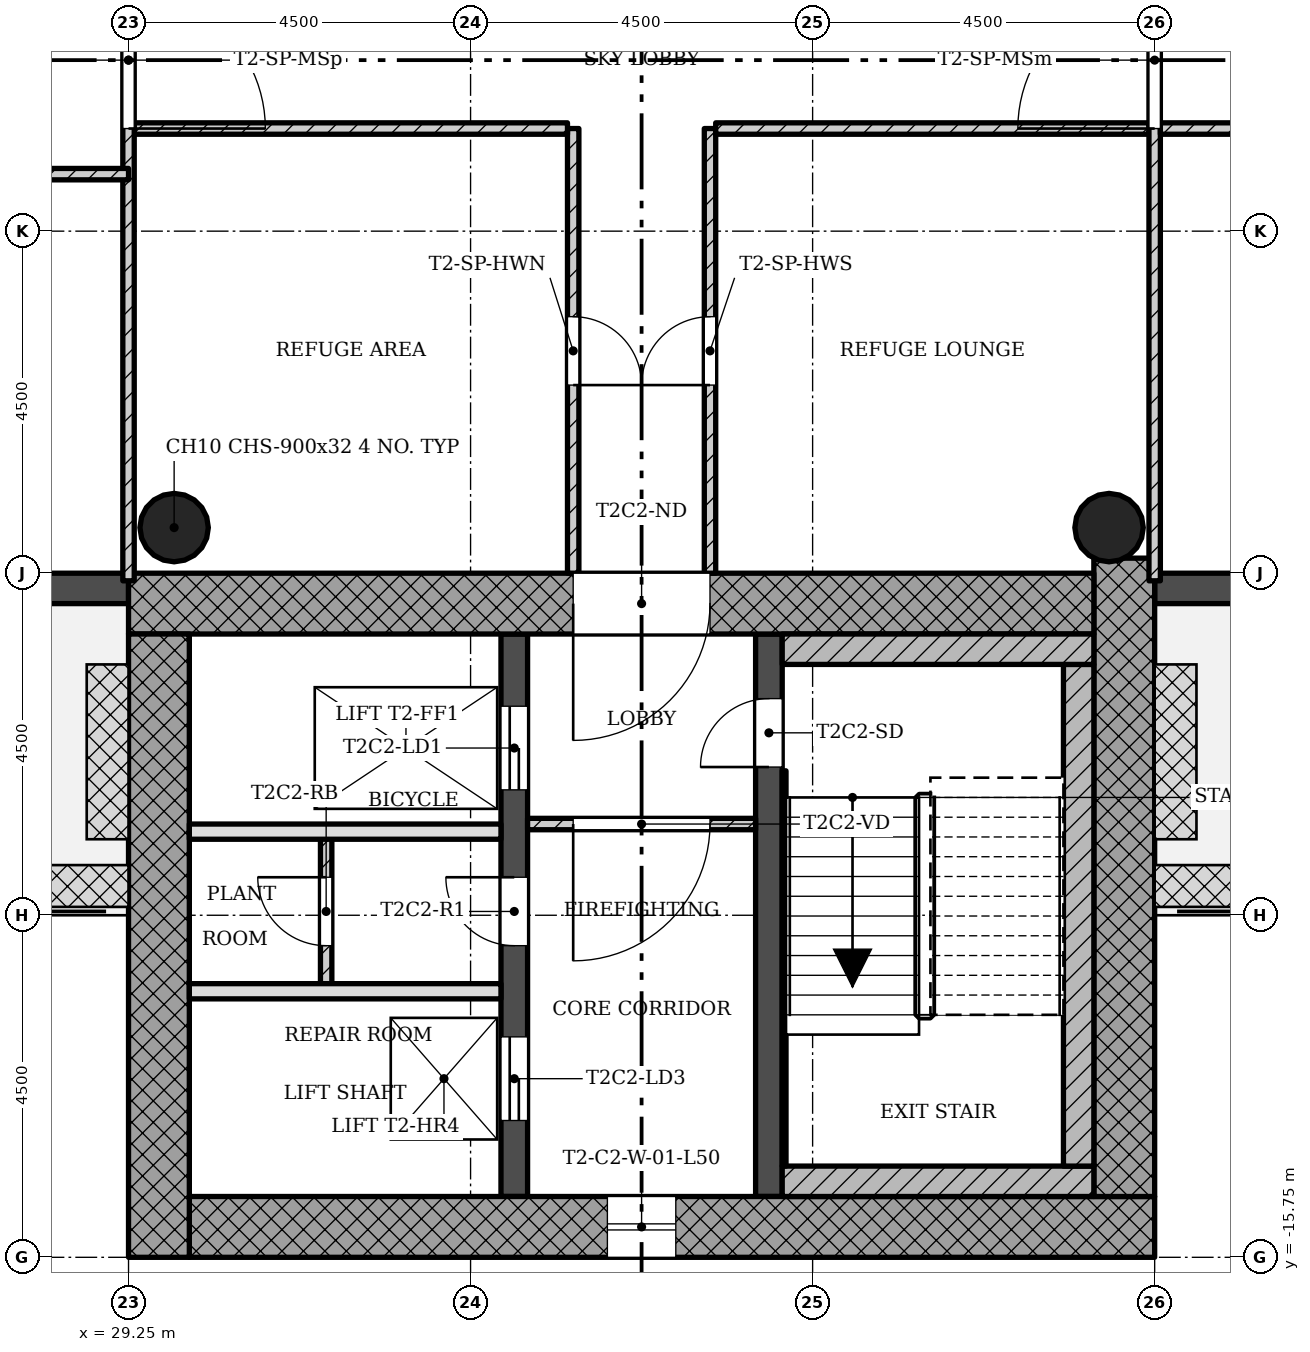
"""IFC4 building model, lengths in metres.
Left out: names, types, materials, properties, quantities, classifications, styles, units other than length and angle.
Written with IfcOpenShell. Run it as: python <this file> out.ifc"""

import sys

from ifc_helpers import new_model, si_unit, direction, frame, frame_2d, origin, origin_2d, place, context, subcontext, project, spatial, rectangle, hollow_circle, extrude, element, fill, save


model = new_model("IFC4")
c1 = context("Model", 3, precision=1e-05, world=origin(), true_north=direction((0.0, 1.0)))
c2 = subcontext(c1, "Body", "Model", "MODEL_VIEW")
j1 = project(units=[si_unit("LENGTHUNIT", "METRE"), si_unit("PLANEANGLEUNIT", "RADIAN")], contexts=[c1])
p1 = place(None, origin())
s1 = spatial("IfcSite", under=j1, at=p1, CompositionType="ELEMENT")
p2 = place(p1, origin())
s2 = spatial("IfcBuilding", under=s1, at=p2, CompositionType="ELEMENT")
p3 = place(p2, frame((0.0, 0.0, 181.3)))
s3 = spatial("IfcBuildingStorey", under=s2, at=p3, CompositionType="ELEMENT", Elevation=181.3)
p4 = place(p3, frame((30.05, -15.35, 0.0), z_axis=(0.0, 0.0, 1.0), x_axis=(1.0, 0.0, 0.0)))
e1 = element("IfcWall", 1, at=p4, inside=s3, PredefinedType="SHEAR", context=c2, shape_type="SweptSolid", body=[
    extrude(rectangle(XDim=12.7, YDim=0.8, at=frame_2d((6.35, 0.0))), origin(), (0.0, 0.0, 1.0), 4.5),
])
p5 = place(p4, frame((5.5, 0.0, 0.45)))
e2 = element("IfcOpeningElement", 2, at=p5, cuts=e1, PredefinedType="OPENING", context=c2, shape_type="SweptSolid", body=[
    extrude(rectangle(XDim=0.9, YDim=2.4, at=frame_2d((0.45, 1.2))), frame((0.0, 0.41, 0.0), z_axis=(0.0, -1.0, 0.0), x_axis=(1.0, 0.0, 0.0)), (0.0, 0.0, 1.0), 0.82),
])
p6 = place(p3, frame((42.35, -14.95, 0.0), z_axis=(0.0, 0.0, 1.0), x_axis=(0.0, 1.0, 0.0)))
e3 = element("IfcWall", 3, at=p6, inside=s3, PredefinedType="SHEAR", context=c2, shape_type="SweptSolid", body=[
    extrude(rectangle(XDim=8.398, YDim=0.8, at=frame_2d((4.199, 0.0))), origin(), (0.0, 0.0, 1.0), 4.5),
])
p7 = place(p3, frame((41.95, -7.15, 0.0), z_axis=(0.0, 0.0, 1.0), x_axis=(-1.0, 0.0, 0.0)))
e4 = element("IfcWall", 4, at=p7, inside=s3, PredefinedType="SHEAR", context=c2, shape_type="SweptSolid", body=[
    extrude(rectangle(XDim=12.7, YDim=0.8, at=frame_2d((6.35, 0.0))), origin(), (0.0, 0.0, 1.0), 4.5),
])
p8 = place(p7, frame((5.05, 0.0, 0.0)))
e5 = element("IfcOpeningElement", 5, at=p8, cuts=e4, PredefinedType="OPENING", context=c2, shape_type="SweptSolid", body=[
    extrude(rectangle(XDim=1.8, YDim=2.1, at=frame_2d((0.9, 1.05))), frame((0.0, 0.41, 0.0), z_axis=(0.0, -1.0, 0.0), x_axis=(1.0, 0.0, 0.0)), (0.0, 0.0, 1.0), 0.82),
])
p9 = place(p3, frame((29.65, -7.55, 0.0), z_axis=(0.0, 0.0, 1.0), x_axis=(0.0, -1.0, 0.0)))
e6 = element("IfcWall", 6, at=p9, inside=s3, PredefinedType="SHEAR", context=c2, shape_type="SweptSolid", body=[
    extrude(rectangle(XDim=8.2, YDim=0.8, at=frame_2d((4.1, 0.0))), origin(), (0.0, 0.0, 1.0), 4.5),
])
p10 = place(p3, frame((34.325, -14.95, 0.0), z_axis=(0.0, 0.0, 1.0), x_axis=(0.0, 1.0, 0.0)))
e7 = element("IfcWall", 7, at=p10, inside=s3, PredefinedType="SHEAR", context=c2, shape_type="SweptSolid", body=[
    extrude(rectangle(XDim=7.4, YDim=0.35, at=frame_2d((3.7, 0.0))), origin(), (0.0, 0.0, 1.0), 4.5),
])
p11 = place(p10, frame((5.35, 0.0, 0.0)))
e8 = element("IfcOpeningElement", 8, at=p11, cuts=e7, PredefinedType="OPENING", context=c2, shape_type="SweptSolid", body=[
    extrude(rectangle(XDim=1.1, YDim=2.1, at=frame_2d((0.55, 1.05))), frame((0.0, 0.185, 0.0), z_axis=(0.0, -1.0, 0.0), x_axis=(1.0, 0.0, 0.0)), (0.0, 0.0, 1.0), 0.37),
])
p12 = place(p10, frame((1.0, 0.0, 0.0)))
e9 = element("IfcOpeningElement", 9, at=p12, cuts=e7, PredefinedType="OPENING", context=c2, shape_type="SweptSolid", body=[
    extrude(rectangle(XDim=1.1, YDim=2.1, at=frame_2d((0.55, 1.05))), frame((0.0, 0.185, 0.0), z_axis=(0.0, -1.0, 0.0), x_axis=(1.0, 0.0, 0.0)), (0.0, 0.0, 1.0), 0.37),
])
p13 = place(p10, frame((3.3, 0.0, 0.0)))
e10 = element("IfcOpeningElement", 10, at=p13, cuts=e7, PredefinedType="OPENING", context=c2, shape_type="SweptSolid", body=[
    extrude(rectangle(XDim=0.9, YDim=2.1, at=frame_2d((0.45, 1.05))), frame((0.0, 0.185, 0.0), z_axis=(0.0, -1.0, 0.0), x_axis=(1.0, 0.0, 0.0)), (0.0, 0.0, 1.0), 0.37),
])
p14 = place(p3, frame((37.675, -14.95, 0.0), z_axis=(0.0, 0.0, 1.0), x_axis=(0.0, 1.0, 0.0)))
e11 = element("IfcWall", 11, at=p14, inside=s3, PredefinedType="SHEAR", context=c2, shape_type="SweptSolid", body=[
    extrude(rectangle(XDim=7.4, YDim=0.35, at=frame_2d((3.7, 0.0))), origin(), (0.0, 0.0, 1.0), 4.5),
])
p15 = place(p14, frame((5.65, 0.0, 0.0)))
e12 = element("IfcOpeningElement", 12, at=p15, cuts=e11, PredefinedType="OPENING", context=c2, shape_type="SweptSolid", body=[
    extrude(rectangle(XDim=0.9, YDim=2.1, at=frame_2d((0.45, 1.05))), frame((0.0, 0.185, 0.0), z_axis=(0.0, -1.0, 0.0), x_axis=(1.0, 0.0, 0.0)), (0.0, 0.0, 1.0), 0.37),
])
for number, where, z_axis, x_axis in (
    (13, (42.15, -6.15, 0.0), (0.0, 0.0, 1.0), (1.0, 0.0, 0.0)),
    (14, (29.85, -6.15, 0.0), (0.0, 0.0, 1.0), (1.0, 0.0, 0.0)),
):
    element("IfcColumn", number, at=place(p3, frame(where, z_axis=z_axis, x_axis=x_axis)), inside=s3, PredefinedType="COLUMN", context=c2, shape_type="SweptSolid", body=[
        extrude(hollow_circle(Radius=0.45, WallThickness=0.032, at=origin_2d()), origin(), (0.0, 0.0, 1.0), 4.5),
    ])
p16 = place(p3, frame((42.75, -6.95, -0.02), z_axis=(0.0, 0.0, 1.0), x_axis=(1.0, 0.0, 0.0)))
e15 = element("IfcWall", 15, at=p16, inside=s3, PredefinedType="STANDARD", context=c2, shape_type="SweptSolid", body=[
    extrude(rectangle(XDim=4.5, YDim=0.4, at=frame_2d((2.25, 0.0))), origin(), (0.0, 0.0, 1.0), 4.22),
])
p17 = place(p16, frame((1.35, 0.0, 0.02)))
e16 = element("IfcOpeningElement", 16, at=p17, cuts=e15, PredefinedType="OPENING", context=c2, shape_type="SweptSolid", body=[
    extrude(rectangle(XDim=1.8, YDim=2.1, at=frame_2d((0.9, 1.05))), frame((0.0, 0.21, 0.0), z_axis=(0.0, -1.0, 0.0), x_axis=(1.0, 0.0, 0.0)), (0.0, 0.0, 1.0), 0.42),
])
p18 = place(p3, frame((24.75, -6.95, -0.02), z_axis=(0.0, 0.0, 1.0), x_axis=(1.0, 0.0, 0.0)))
e17 = element("IfcWall", 17, at=p18, inside=s3, PredefinedType="STANDARD", context=c2, shape_type="SweptSolid", body=[
    extrude(rectangle(XDim=4.5, YDim=0.4, at=frame_2d((2.25, 0.0))), origin(), (0.0, 0.0, 1.0), 4.22),
])
p19 = place(p18, frame((1.35, 0.0, 0.02)))
e18 = element("IfcOpeningElement", 18, at=p19, cuts=e17, PredefinedType="OPENING", context=c2, shape_type="SweptSolid", body=[
    extrude(rectangle(XDim=1.8, YDim=2.1, at=frame_2d((0.9, 1.05))), frame((0.0, 0.21, 0.0), z_axis=(0.0, -1.0, 0.0), x_axis=(1.0, 0.0, 0.0)), (0.0, 0.0, 1.0), 0.42),
])
p20 = place(p3, frame((34.5, -10.05, 0.0), z_axis=(0.0, 0.0, 1.0), x_axis=(1.0, 0.0, 0.0)))
e19 = element("IfcWall", 19, at=p20, inside=s3, PredefinedType="PARTITIONING", context=c2, shape_type="SweptSolid", body=[
    extrude(rectangle(XDim=3.0, YDim=0.15, at=frame_2d((1.5, 0.0))), origin(), (0.0, 0.0, 1.0), 4.08),
])
p21 = place(p20, frame((0.6, 0.0, 0.0)))
e20 = element("IfcOpeningElement", 20, at=p21, cuts=e19, PredefinedType="OPENING", context=c2, shape_type="SweptSolid", body=[
    extrude(rectangle(XDim=1.8, YDim=2.1, at=frame_2d((0.9, 1.05))), frame((0.0, 0.085, 0.0), z_axis=(0.0, -1.0, 0.0), x_axis=(1.0, 0.0, 0.0)), (0.0, 0.0, 1.0), 0.17),
])
for number, where, z_axis, x_axis in (
    (21, (30.05, -12.25, 0.0), (0.0, 0.0, 1.0), (1.0, 0.0, 0.0)),
    (22, (30.05, -10.15, 0.0), (0.0, 0.0, 1.0), (1.0, 0.0, 0.0)),
):
    element("IfcWall", number, at=place(p3, frame(where, z_axis=z_axis, x_axis=x_axis)), inside=s3, PredefinedType="SOLIDWALL", context=c2, shape_type="SweptSolid", body=[
        extrude(rectangle(XDim=4.1, YDim=0.2, at=frame_2d((2.05, 0.0))), origin(), (0.0, 0.0, 1.0), 4.08),
    ])
p22 = place(p3, frame((31.85, -10.15, 0.0), z_axis=(0.0, 0.0, 1.0), x_axis=(0.0, -1.0, 0.0)))
e23 = element("IfcWall", 23, at=p22, inside=s3, PredefinedType="PARTITIONING", context=c2, shape_type="SweptSolid", body=[
    extrude(rectangle(XDim=2.1, YDim=0.15, at=frame_2d((1.05, 0.0))), origin(), (0.0, 0.0, 1.0), 4.08),
])
p23 = place(p22, frame((0.6, 0.0, 0.0)))
e24 = element("IfcOpeningElement", 24, at=p23, cuts=e23, PredefinedType="OPENING", context=c2, shape_type="SweptSolid", body=[
    extrude(rectangle(XDim=0.9, YDim=2.1, at=frame_2d((0.45, 1.05))), frame((0.0, 0.085, 0.0), z_axis=(0.0, -1.0, 0.0), x_axis=(1.0, 0.0, 0.0)), (0.0, 0.0, 1.0), 0.17),
])
p24 = place(p3, frame((35.1, -6.75, 0.0), z_axis=(0.0, 0.0, 1.0), x_axis=(0.0, 1.0, 0.0)))
e25 = element("IfcWall", 25, at=p24, inside=s3, PredefinedType="PARTITIONING", context=c2, shape_type="SweptSolid", body=[
    extrude(rectangle(XDim=5.85, YDim=0.15, at=frame_2d((2.925, 0.0))), origin(), (0.0, 0.0, 1.0), 4.08),
])
p25 = place(p24, frame((2.475, 0.0, 0.0)))
e26 = element("IfcOpeningElement", 26, at=p25, cuts=e25, PredefinedType="OPENING", context=c2, shape_type="SweptSolid", body=[
    extrude(rectangle(XDim=0.9, YDim=2.1, at=frame_2d((0.45, 1.05))), frame((0.0, 0.085, 0.0), z_axis=(0.0, -1.0, 0.0), x_axis=(1.0, 0.0, 0.0)), (0.0, 0.0, 1.0), 0.17),
])
p26 = place(p3, frame((35.025, -0.9, 0.0), z_axis=(0.0, 0.0, 1.0), x_axis=(-1.0, 0.0, 0.0)))
e27 = element("IfcWall", 27, at=p26, inside=s3, PredefinedType="PARTITIONING", context=c2, shape_type="SweptSolid", body=[
    extrude(rectangle(XDim=5.7, YDim=0.15, at=frame_2d((2.85, 0.0))), origin(), (0.0, 0.0, 1.0), 4.08),
])
p27 = place(p3, frame((36.9, -6.75, 0.0), z_axis=(0.0, 0.0, 1.0), x_axis=(0.0, 1.0, 0.0)))
e28 = element("IfcWall", 28, at=p27, inside=s3, PredefinedType="PARTITIONING", context=c2, shape_type="SweptSolid", body=[
    extrude(rectangle(XDim=5.85, YDim=0.15, at=frame_2d((2.925, 0.0))), origin(), (0.0, 0.0, 1.0), 4.08),
])
p28 = place(p27, frame((2.475, 0.0, 0.0)))
e29 = element("IfcOpeningElement", 29, at=p28, cuts=e28, PredefinedType="OPENING", context=c2, shape_type="SweptSolid", body=[
    extrude(rectangle(XDim=0.9, YDim=2.1, at=frame_2d((0.45, 1.05))), frame((0.0, 0.085, 0.0), z_axis=(0.0, -1.0, 0.0), x_axis=(1.0, 0.0, 0.0)), (0.0, 0.0, 1.0), 0.17),
])
p29 = place(p3, frame((42.675, -0.9, 0.0), z_axis=(0.0, 0.0, 1.0), x_axis=(-1.0, 0.0, 0.0)))
e30 = element("IfcWall", 30, at=p29, inside=s3, PredefinedType="PARTITIONING", context=c2, shape_type="SweptSolid", body=[
    extrude(rectangle(XDim=5.7, YDim=0.15, at=frame_2d((2.85, 0.0))), origin(), (0.0, 0.0, 1.0), 4.08),
])
p30 = place(p3, frame((29.25, -6.85, 0.0), z_axis=(0.0, 0.0, 1.0), x_axis=(0.0, 1.0, 0.0)))
e31 = element("IfcWall", 31, at=p30, inside=s3, PredefinedType="PARTITIONING", context=c2, shape_type="SweptSolid", body=[
    extrude(rectangle(XDim=13.7, YDim=0.15, at=frame_2d((6.85, 0.0))), origin(), (0.0, 0.0, 1.0), 4.08),
])
p31 = place(p30, frame((5.95, 0.0, 0.0)))
e32 = element("IfcOpeningElement", 32, at=p31, cuts=e31, PredefinedType="OPENING", context=c2, shape_type="SweptSolid", body=[
    extrude(rectangle(XDim=1.8, YDim=2.1, at=frame_2d((0.9, 1.05))), frame((0.0, 0.085, 0.0), z_axis=(0.0, -1.0, 0.0), x_axis=(1.0, 0.0, 0.0)), (0.0, 0.0, 1.0), 0.17),
])
p32 = place(p3, frame((29.25, -1.5, 0.0), z_axis=(0.0, 0.0, 1.0), x_axis=(-1.0, 0.0, 0.0)))
e33 = element("IfcWall", 33, at=p32, inside=s3, PredefinedType="PARTITIONING", context=c2, shape_type="SweptSolid", body=[
    extrude(rectangle(XDim=13.6, YDim=0.15, at=frame_2d((6.8, 0.0))), origin(), (0.0, 0.0, 1.0), 4.08),
])
p33 = place(p32, frame((1.8, 0.0, 0.0)))
e34 = element("IfcOpeningElement", 34, at=p33, cuts=e33, PredefinedType="OPENING", context=c2, shape_type="SweptSolid", body=[
    extrude(rectangle(XDim=0.9, YDim=2.1, at=frame_2d((0.45, 1.05))), frame((0.0, 0.085, 0.0), z_axis=(0.0, -1.0, 0.0), x_axis=(1.0, 0.0, 0.0)), (0.0, 0.0, 1.0), 0.17),
])
p34 = place(p32, frame((6.3, 0.0, 0.0)))
e35 = element("IfcOpeningElement", 35, at=p34, cuts=e33, PredefinedType="OPENING", context=c2, shape_type="SweptSolid", body=[
    extrude(rectangle(XDim=0.9, YDim=2.1, at=frame_2d((0.45, 1.05))), frame((0.0, 0.085, 0.0), z_axis=(0.0, -1.0, 0.0), x_axis=(1.0, 0.0, 0.0)), (0.0, 0.0, 1.0), 0.17),
])
p35 = place(p32, frame((10.8, 0.0, 0.0)))
e36 = element("IfcOpeningElement", 36, at=p35, cuts=e33, PredefinedType="OPENING", context=c2, shape_type="SweptSolid", body=[
    extrude(rectangle(XDim=0.9, YDim=2.1, at=frame_2d((0.45, 1.05))), frame((0.0, 0.085, 0.0), z_axis=(0.0, -1.0, 0.0), x_axis=(1.0, 0.0, 0.0)), (0.0, 0.0, 1.0), 0.17),
])
p36 = place(p3, frame((42.75, -6.85, 0.0), z_axis=(0.0, 0.0, 1.0), x_axis=(0.0, 1.0, 0.0)))
e37 = element("IfcWall", 37, at=p36, inside=s3, PredefinedType="PARTITIONING", context=c2, shape_type="SweptSolid", body=[
    extrude(rectangle(XDim=13.7, YDim=0.15, at=frame_2d((6.85, 0.0))), origin(), (0.0, 0.0, 1.0), 4.08),
])
p37 = place(p36, frame((5.95, 0.0, 0.0)))
e38 = element("IfcOpeningElement", 38, at=p37, cuts=e37, PredefinedType="OPENING", context=c2, shape_type="SweptSolid", body=[
    extrude(rectangle(XDim=1.8, YDim=2.1, at=frame_2d((0.9, 1.05))), frame((0.0, 0.085, 0.0), z_axis=(0.0, -1.0, 0.0), x_axis=(1.0, 0.0, 0.0)), (0.0, 0.0, 1.0), 0.17),
])
p38 = place(p3, frame((51.85, -0.9, 0.0), z_axis=(0.0, 0.0, 1.0), x_axis=(-1.0, 0.0, 0.0)))
e39 = element("IfcWall", 39, at=p38, inside=s3, PredefinedType="PARTITIONING", context=c2, shape_type="SweptSolid", body=[
    extrude(rectangle(XDim=9.025, YDim=0.15, at=frame_2d((4.513, 0.0))), origin(), (0.0, 0.0, 1.0), 4.08),
])
p39 = place(p38, frame((1.9, 0.0, 0.0)))
e40 = element("IfcOpeningElement", 40, at=p39, cuts=e39, PredefinedType="OPENING", context=c2, shape_type="SweptSolid", body=[
    extrude(rectangle(XDim=0.9, YDim=2.1, at=frame_2d((0.45, 1.05))), frame((0.0, 0.085, 0.0), z_axis=(0.0, -1.0, 0.0), x_axis=(1.0, 0.0, 0.0)), (0.0, 0.0, 1.0), 0.17),
])
p40 = place(p38, frame((6.4, 0.0, 0.0)))
e41 = element("IfcOpeningElement", 41, at=p40, cuts=e39, PredefinedType="OPENING", context=c2, shape_type="SweptSolid", body=[
    extrude(rectangle(XDim=0.9, YDim=2.1, at=frame_2d((0.45, 1.05))), frame((0.0, 0.085, 0.0), z_axis=(0.0, -1.0, 0.0), x_axis=(1.0, 0.0, 0.0)), (0.0, 0.0, 1.0), 0.17),
])
p41 = place(p3, frame((37.85, -14.75, 0.0), z_axis=(0.0, 0.0, 1.0), x_axis=(1.0, 0.0, 0.0)))
e42 = element("IfcWall", 42, at=p41, inside=s3, PredefinedType="SHEAR", context=c2, shape_type="SweptSolid", body=[
    extrude(rectangle(XDim=4.1, YDim=0.4, at=frame_2d((2.05, 0.0))), origin(), (0.0, 0.0, 1.0), 4.5),
])
p42 = place(p3, frame((41.75, -7.95, 0.0), z_axis=(0.0, 0.0, 1.0), x_axis=(0.0, -1.0, 0.0)))
e43 = element("IfcWall", 43, at=p42, inside=s3, PredefinedType="SHEAR", context=c2, shape_type="SweptSolid", body=[
    extrude(rectangle(XDim=6.6, YDim=0.4, at=frame_2d((3.3, 0.0))), origin(), (0.0, 0.0, 1.0), 4.5),
])
p43 = place(p3, frame((37.85, -7.75, 0.0), z_axis=(0.0, 0.0, 1.0), x_axis=(1.0, 0.0, 0.0)))
e44 = element("IfcWall", 44, at=p43, inside=s3, PredefinedType="SHEAR", context=c2, shape_type="SweptSolid", body=[
    extrude(rectangle(XDim=4.1, YDim=0.4, at=frame_2d((2.05, 0.0))), origin(), (0.0, 0.0, 1.0), 4.5),
])
p44 = place(p3, frame((37.875, -9.35, 0.0), z_axis=(0.0, 0.0, 1.0), x_axis=(0.0, -1.0, 0.0)))
e45 = element("IfcWall", 45, at=p44, inside=s3, PredefinedType="SHEAR", context=c2, shape_type="SweptSolid", body=[
    extrude(rectangle(XDim=5.2, YDim=0.05, at=frame_2d((2.6, 0.0))), origin(), (0.0, 0.0, 1.0), 4.5),
])
p45 = place(p5, origin())
e46 = element("IfcWindow", 46, at=p45, inside=s3, PartitioningType="SINGLE_PANEL", PredefinedType="WINDOW", context=c2, shape_type="SweptSolid", body=[
    extrude(rectangle(XDim=0.9, YDim=2.4, at=frame_2d((0.45, 1.2))), frame((0.0, 0.03, 0.0), z_axis=(0.0, -1.0, 0.0), x_axis=(1.0, 0.0, 0.0)), (0.0, 0.0, 1.0), 0.06),
])
fill(e2, e46)
p46 = place(p21, origin())
e47 = element("IfcDoor", 47, at=p46, inside=s3, OperationType="SINGLE_SWING_LEFT", PredefinedType="DOOR", context=c2, shape_type="SweptSolid", body=[
    extrude(rectangle(XDim=1.8, YDim=2.1, at=frame_2d((0.9, 1.05))), frame((0.0, 0.025, 0.0), z_axis=(0.0, -1.0, 0.0), x_axis=(1.0, 0.0, 0.0)), (0.0, 0.0, 1.0), 0.05),
])
fill(e20, e47)
p47 = place(p23, origin())
e48 = element("IfcDoor", 48, at=p47, inside=s3, OperationType="SINGLE_SWING_LEFT", PredefinedType="DOOR", context=c2, shape_type="SweptSolid", body=[
    extrude(rectangle(XDim=0.9, YDim=2.1, at=frame_2d((0.45, 1.05))), frame((0.0, 0.025, 0.0), z_axis=(0.0, -1.0, 0.0), x_axis=(1.0, 0.0, 0.0)), (0.0, 0.0, 1.0), 0.05),
])
fill(e24, e48)
p48 = place(p25, origin())
e49 = element("IfcDoor", 49, at=p48, inside=s3, OperationType="SINGLE_SWING_LEFT", PredefinedType="DOOR", context=c2, shape_type="SweptSolid", body=[
    extrude(rectangle(XDim=0.9, YDim=2.1, at=frame_2d((0.45, 1.05))), frame((0.0, 0.025, 0.0), z_axis=(0.0, -1.0, 0.0), x_axis=(1.0, 0.0, 0.0)), (0.0, 0.0, 1.0), 0.05),
])
fill(e26, e49)
p49 = place(p28, origin())
e50 = element("IfcDoor", 50, at=p49, inside=s3, OperationType="SINGLE_SWING_RIGHT", PredefinedType="DOOR", context=c2, shape_type="SweptSolid", body=[
    extrude(rectangle(XDim=0.9, YDim=2.1, at=frame_2d((0.45, 1.05))), frame((0.0, 0.025, 0.0), z_axis=(0.0, -1.0, 0.0), x_axis=(1.0, 0.0, 0.0)), (0.0, 0.0, 1.0), 0.05),
])
fill(e29, e50)
p50 = place(p31, origin())
e51 = element("IfcDoor", 51, at=p50, inside=s3, OperationType="SINGLE_SWING_LEFT", PredefinedType="DOOR", context=c2, shape_type="SweptSolid", body=[
    extrude(rectangle(XDim=1.8, YDim=2.1, at=frame_2d((0.9, 1.05))), frame((0.0, 0.025, 0.0), z_axis=(0.0, -1.0, 0.0), x_axis=(1.0, 0.0, 0.0)), (0.0, 0.0, 1.0), 0.05),
])
fill(e32, e51)
p51 = place(p37, origin())
e52 = element("IfcDoor", 52, at=p51, inside=s3, OperationType="SINGLE_SWING_RIGHT", PredefinedType="DOOR", context=c2, shape_type="SweptSolid", body=[
    extrude(rectangle(XDim=1.8, YDim=2.1, at=frame_2d((0.9, 1.05))), frame((0.0, 0.025, 0.0), z_axis=(0.0, -1.0, 0.0), x_axis=(1.0, 0.0, 0.0)), (0.0, 0.0, 1.0), 0.05),
])
fill(e38, e52)
p52 = place(p15, origin())
e53 = element("IfcDoor", 53, at=p52, inside=s3, OperationType="SINGLE_SWING_RIGHT", PredefinedType="DOOR", context=c2, shape_type="SweptSolid", body=[
    extrude(rectangle(XDim=0.9, YDim=2.1, at=frame_2d((0.45, 1.05))), frame((0.0, 0.025, 0.0), z_axis=(0.0, -1.0, 0.0), x_axis=(1.0, 0.0, 0.0)), (0.0, 0.0, 1.0), 0.05),
])
fill(e12, e53)
p53 = place(p11, origin())
e54 = element("IfcDoor", 54, at=p53, inside=s3, OperationType="SLIDING_TO_LEFT", PredefinedType="DOOR", context=c2, shape_type="SweptSolid", body=[
    extrude(rectangle(XDim=1.1, YDim=2.1, at=frame_2d((0.55, 1.05))), frame((0.0, 0.025, 0.0), z_axis=(0.0, -1.0, 0.0), x_axis=(1.0, 0.0, 0.0)), (0.0, 0.0, 1.0), 0.05),
])
fill(e8, e54)
p54 = place(p12, origin())
e55 = element("IfcDoor", 55, at=p54, inside=s3, OperationType="SLIDING_TO_LEFT", PredefinedType="DOOR", context=c2, shape_type="SweptSolid", body=[
    extrude(rectangle(XDim=1.1, YDim=2.1, at=frame_2d((0.55, 1.05))), frame((0.0, 0.025, 0.0), z_axis=(0.0, -1.0, 0.0), x_axis=(1.0, 0.0, 0.0)), (0.0, 0.0, 1.0), 0.05),
])
fill(e9, e55)
p55 = place(p13, origin())
e56 = element("IfcDoor", 56, at=p55, inside=s3, OperationType="SINGLE_SWING_LEFT", PredefinedType="DOOR", context=c2, shape_type="SweptSolid", body=[
    extrude(rectangle(XDim=0.9, YDim=2.1, at=frame_2d((0.45, 1.05))), frame((0.0, 0.025, 0.0), z_axis=(0.0, -1.0, 0.0), x_axis=(1.0, 0.0, 0.0)), (0.0, 0.0, 1.0), 0.05),
])
fill(e10, e56)
p56 = place(p8, origin())
e57 = element("IfcDoor", 57, at=p56, inside=s3, OperationType="SINGLE_SWING_LEFT", PredefinedType="DOOR", context=c2, shape_type="SweptSolid", body=[
    extrude(rectangle(XDim=1.8, YDim=2.1, at=frame_2d((0.9, 1.05))), frame((0.0, 0.025, 0.0), z_axis=(0.0, -1.0, 0.0), x_axis=(1.0, 0.0, 0.0)), (0.0, 0.0, 1.0), 0.05),
])
fill(e5, e57)
save(model, sys.argv[1])
